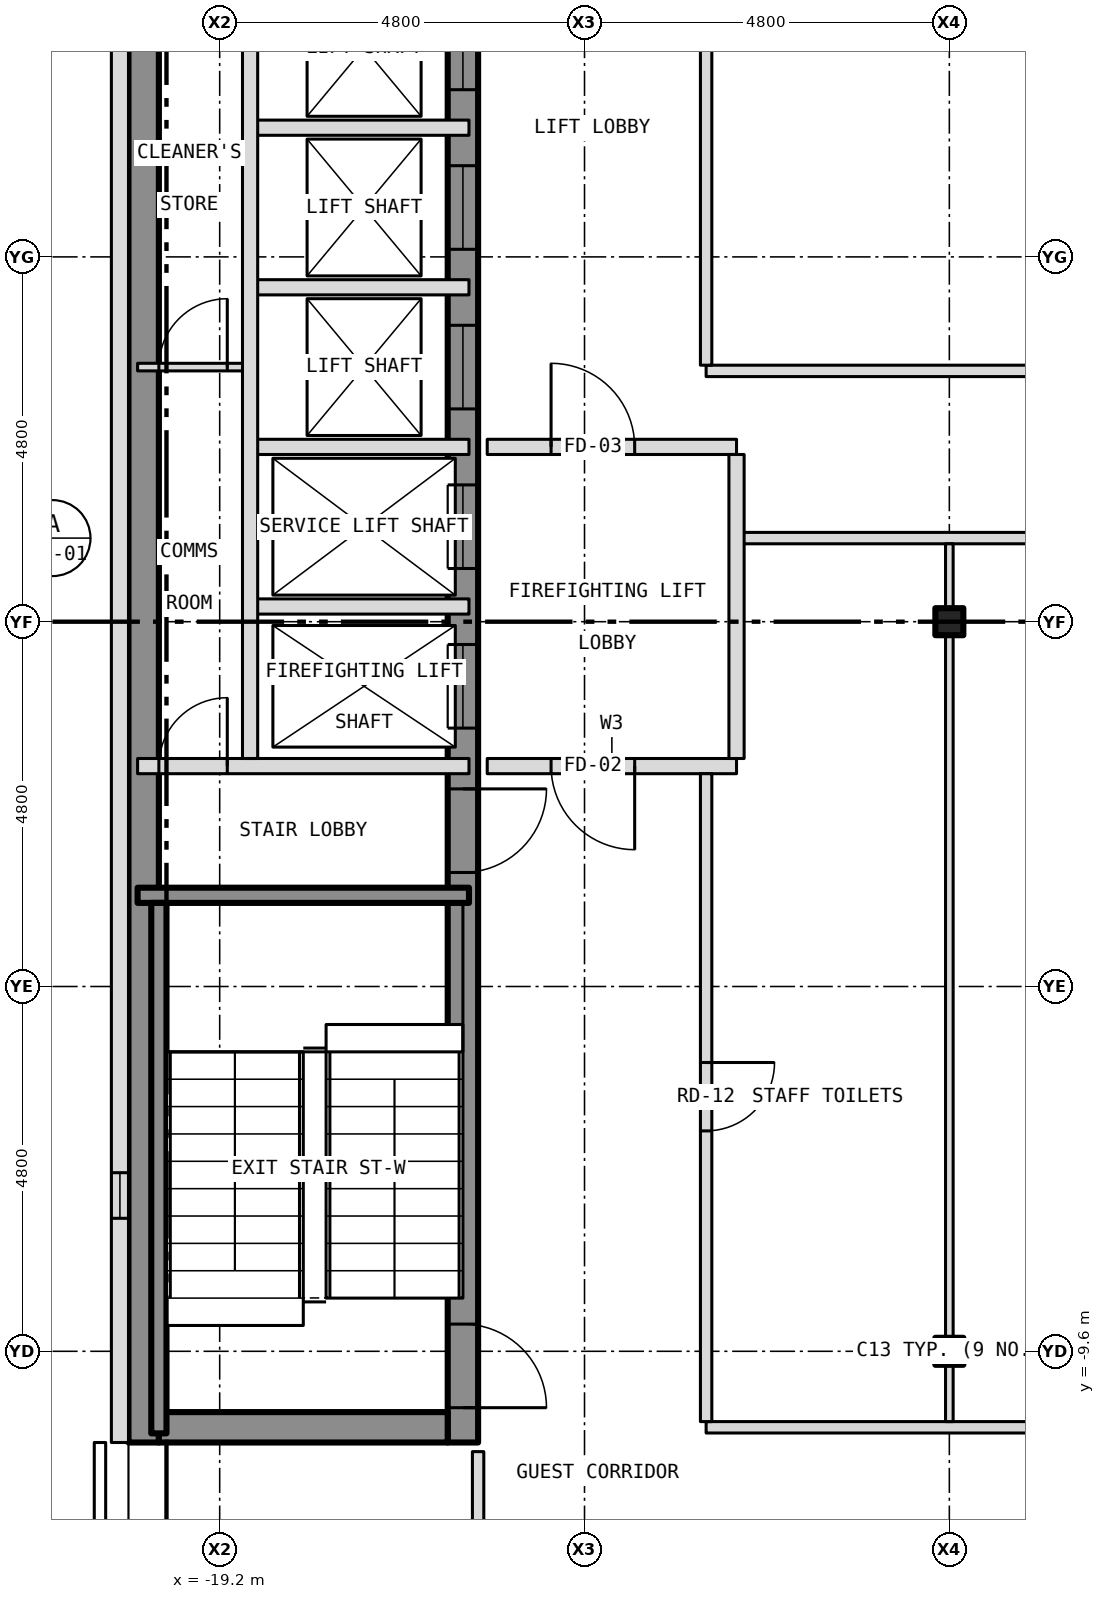
"""IFC4 building model, lengths in metres.
Left out: names, types, materials, properties, quantities, classifications, styles, units other than length and angle.
Written with IfcOpenShell. Run it as: python <this file> out.ifc"""

import sys

from ifc_helpers import new_model, si_unit, direction, frame, frame_2d, origin, origin_2d, place, context, subcontext, project, spatial, rectangle, i_section, extrude, element, fill, save


model = new_model("IFC4")
c1 = context("Model", 3, precision=1e-05, world=origin(), true_north=direction((0.0, 1.0)))
c2 = subcontext(c1, "Body", "Model", "MODEL_VIEW")
j1 = project(units=[si_unit("LENGTHUNIT", "METRE"), si_unit("PLANEANGLEUNIT", "RADIAN")], contexts=[c1])
p1 = place(None, origin())
s1 = spatial("IfcSite", under=j1, at=p1, CompositionType="ELEMENT")
p2 = place(p1, origin())
s2 = spatial("IfcBuilding", under=s1, at=p2, CompositionType="ELEMENT")
p3 = place(p2, frame((0.0, 0.0, 244.5)))
s3 = spatial("IfcBuildingStorey", under=s2, at=p3, CompositionType="ELEMENT", Elevation=244.5)
for number, where, z_axis, x_axis in (
    (1, (-9.6, -9.6, -0.15), (0.0, 0.0, 1.0), (1.0, 0.0, 0.0)),
    (2, (-9.6, 0.0, -0.15), (0.0, 0.0, 1.0), (1.0, 0.0, 0.0)),
):
    element("IfcColumn", number, at=place(p3, frame(where, z_axis=z_axis, x_axis=x_axis)), inside=s3, PredefinedType="COLUMN", context=c2, shape_type="SweptSolid", body=[
        extrude(i_section(OverallWidth=0.368, OverallDepth=0.356, WebThickness=0.011, FlangeThickness=0.018, at=origin_2d()), origin(), (0.0, 0.0, 1.0), 3.5),
    ])
p4 = place(p3, frame((-16.0, -10.8, 0.0), z_axis=(0.0, 0.0, 1.0), x_axis=(0.0, 1.0, 0.0)))
e3 = element("IfcWall", 3, at=p4, inside=s3, PredefinedType="SHEAR", context=c2, shape_type="SweptSolid", body=[
    extrude(rectangle(XDim=21.6, YDim=0.4, at=frame_2d((10.8, 0.0))), origin(), (0.0, 0.0, 1.0), 3.25),
])
p5 = place(p4, frame((9.4, 0.0, 0.0)))
e4 = element("IfcOpeningElement", 4, at=p5, cuts=e3, PredefinedType="OPENING", context=c2, shape_type="SweptSolid", body=[
    extrude(rectangle(XDim=1.1, YDim=2.1, at=frame_2d((0.55, 1.05))), frame((0.0, 0.212, 0.0), z_axis=(0.0, -1.0, 0.0), x_axis=(1.0, 0.0, 0.0)), (0.0, 0.0, 1.0), 0.424),
])
p6 = place(p4, frame((11.5, 0.0, 0.0)))
e5 = element("IfcOpeningElement", 5, at=p6, cuts=e3, PredefinedType="OPENING", context=c2, shape_type="SweptSolid", body=[
    extrude(rectangle(XDim=1.1, YDim=2.1, at=frame_2d((0.55, 1.05))), frame((0.0, 0.212, 0.0), z_axis=(0.0, -1.0, 0.0), x_axis=(1.0, 0.0, 0.0)), (0.0, 0.0, 1.0), 0.424),
])
p7 = place(p4, frame((13.6, 0.0, 0.0)))
e6 = element("IfcOpeningElement", 6, at=p7, cuts=e3, PredefinedType="OPENING", context=c2, shape_type="SweptSolid", body=[
    extrude(rectangle(XDim=1.1, YDim=2.1, at=frame_2d((0.55, 1.05))), frame((0.0, 0.212, 0.0), z_axis=(0.0, -1.0, 0.0), x_axis=(1.0, 0.0, 0.0)), (0.0, 0.0, 1.0), 0.424),
])
p8 = place(p4, frame((15.7, 0.0, 0.0)))
e7 = element("IfcOpeningElement", 7, at=p8, cuts=e3, PredefinedType="OPENING", context=c2, shape_type="SweptSolid", body=[
    extrude(rectangle(XDim=1.1, YDim=2.1, at=frame_2d((0.55, 1.05))), frame((0.0, 0.212, 0.0), z_axis=(0.0, -1.0, 0.0), x_axis=(1.0, 0.0, 0.0)), (0.0, 0.0, 1.0), 0.424),
])
p9 = place(p4, frame((17.8, 0.0, 0.0)))
e8 = element("IfcOpeningElement", 8, at=p9, cuts=e3, PredefinedType="OPENING", context=c2, shape_type="SweptSolid", body=[
    extrude(rectangle(XDim=1.1, YDim=2.1, at=frame_2d((0.55, 1.05))), frame((0.0, 0.212, 0.0), z_axis=(0.0, -1.0, 0.0), x_axis=(1.0, 0.0, 0.0)), (0.0, 0.0, 1.0), 0.424),
])
p10 = place(p4, frame((0.458, 0.0, 0.0)))
e9 = element("IfcOpeningElement", 9, at=p10, cuts=e3, PredefinedType="OPENING", context=c2, shape_type="SweptSolid", body=[
    extrude(rectangle(XDim=1.1, YDim=2.1, at=frame_2d((0.55, 1.05))), frame((0.0, 0.212, 0.0), z_axis=(0.0, -1.0, 0.0), x_axis=(1.0, 0.0, 0.0)), (0.0, 0.0, 1.0), 0.424),
])
p11 = place(p4, frame((7.5, 0.0, 0.0)))
e10 = element("IfcOpeningElement", 10, at=p11, cuts=e3, PredefinedType="OPENING", context=c2, shape_type="SweptSolid", body=[
    extrude(rectangle(XDim=1.1, YDim=2.1, at=frame_2d((0.55, 1.05))), frame((0.0, 0.212, 0.0), z_axis=(0.0, -1.0, 0.0), x_axis=(1.0, 0.0, 0.0)), (0.0, 0.0, 1.0), 0.424),
])
p12 = place(p4, frame((20.0, 0.0, 0.0)))
e11 = element("IfcOpeningElement", 11, at=p12, cuts=e3, PredefinedType="OPENING", context=c2, shape_type="SweptSolid", body=[
    extrude(rectangle(XDim=0.9, YDim=2.1, at=frame_2d((0.45, 1.05))), frame((0.0, 0.212, 0.0), z_axis=(0.0, -1.0, 0.0), x_axis=(1.0, 0.0, 0.0)), (0.0, 0.0, 1.0), 0.424),
])
p13 = place(p3, frame((-20.2, -10.8, 0.0), z_axis=(0.0, 0.0, 1.0), x_axis=(0.0, 1.0, 0.0)))
e12 = element("IfcWall", 12, at=p13, inside=s3, PredefinedType="SHEAR", context=c2, shape_type="SweptSolid", body=[
    extrude(rectangle(XDim=21.6, YDim=0.4, at=frame_2d((10.8, 0.0))), origin(), (0.0, 0.0, 1.0), 3.25),
])
p14 = place(p3, frame((-20.0, -10.6, 0.0), z_axis=(0.0, 0.0, 1.0), x_axis=(1.0, 0.0, 0.0)))
e13 = element("IfcWall", 13, at=p14, inside=s3, PredefinedType="SHEAR", context=c2, shape_type="SweptSolid", body=[
    extrude(rectangle(XDim=3.8, YDim=0.4, at=frame_2d((1.9, 0.0))), origin(), (0.0, 0.0, 1.0), 3.25),
])
p15 = place(p3, frame((-20.512, 10.8, 0.0), z_axis=(0.0, 0.0, 1.0), x_axis=(0.0, -1.0, 0.0)))
e14 = element("IfcWall", 14, at=p15, inside=s3, PredefinedType="SOLIDWALL", context=c2, shape_type="SweptSolid", body=[
    extrude(rectangle(XDim=21.6, YDim=0.225, at=frame_2d((10.8, 0.0))), origin(), (0.0, 0.0, 1.0), 3.5),
])
p16 = place(p15, frame((18.05, 0.0, 1.0)))
e15 = element("IfcOpeningElement", 15, at=p16, cuts=e14, PredefinedType="OPENING", context=c2, shape_type="SweptSolid", body=[
    extrude(rectangle(XDim=0.6, YDim=1.5, at=frame_2d((0.3, 0.75))), frame((0.0, 0.125, 0.0), z_axis=(0.0, -1.0, 0.0), x_axis=(1.0, 0.0, 0.0)), (0.0, 0.0, 1.0), 0.249),
])
p17 = place(p3, frame((-12.8, -10.6, 0.0), z_axis=(0.0, 0.0, 1.0), x_axis=(1.0, 0.0, 0.0)))
e16 = element("IfcWall", 16, at=p17, inside=s3, PredefinedType="PARTITIONING", context=c2, shape_type="SweptSolid", body=[
    extrude(rectangle(XDim=20.3, YDim=0.15, at=frame_2d((10.15, 0.0))), origin(), (0.0, 0.0, 1.0), 3.35),
])
p18 = place(p17, frame((11.3, 0.0, 0.0)))
e17 = element("IfcOpeningElement", 17, at=p18, cuts=e16, PredefinedType="OPENING", context=c2, shape_type="SweptSolid", body=[
    extrude(rectangle(XDim=0.9, YDim=2.1, at=frame_2d((0.45, 1.05))), frame((0.0, 0.087, 0.0), z_axis=(0.0, -1.0, 0.0), x_axis=(1.0, 0.0, 0.0)), (0.0, 0.0, 1.0), 0.174),
])
p19 = place(p3, frame((-20.28, -3.6, 0.0), z_axis=(0.0, 0.0, 1.0), x_axis=(1.0, 0.0, 0.0)))
e18 = element("IfcWall", 18, at=p19, inside=s3, PredefinedType="SHEAR", context=c2, shape_type="SweptSolid", body=[
    extrude(rectangle(XDim=4.36, YDim=0.2, at=frame_2d((2.18, 0.0))), origin(), (0.0, 0.0, 1.0), 3.25),
])
p20 = place(p3, frame((-20.28, -1.9, 0.0), z_axis=(0.0, 0.0, 1.0), x_axis=(1.0, 0.0, 0.0)))
e19 = element("IfcWall", 19, at=p20, inside=s3, PredefinedType="PARTITIONING", context=c2, shape_type="SweptSolid", body=[
    extrude(rectangle(XDim=4.36, YDim=0.2, at=frame_2d((2.18, 0.0))), origin(), (0.0, 0.0, 1.0), 3.25),
])
p21 = place(p20, frame((0.28, 0.0, 0.0)))
e20 = element("IfcOpeningElement", 20, at=p21, cuts=e19, PredefinedType="OPENING", context=c2, shape_type="SweptSolid", body=[
    extrude(rectangle(XDim=0.9, YDim=2.1, at=frame_2d((0.45, 1.05))), frame((0.0, 0.112, 0.0), z_axis=(0.0, -1.0, 0.0), x_axis=(1.0, 0.0, 0.0)), (0.0, 0.0, 1.0), 0.224),
])
p22 = place(p3, frame((-15.68, -1.9, 0.0), z_axis=(0.0, 0.0, 1.0), x_axis=(1.0, 0.0, 0.0)))
e21 = element("IfcWall", 21, at=p22, inside=s3, PredefinedType="PARTITIONING", context=c2, shape_type="SweptSolid", body=[
    extrude(rectangle(XDim=3.28, YDim=0.2, at=frame_2d((1.64, 0.0))), origin(), (0.0, 0.0, 1.0), 3.35),
])
p23 = place(p22, frame((0.84, 0.0, 0.0)))
e22 = element("IfcOpeningElement", 22, at=p23, cuts=e21, PredefinedType="OPENING", context=c2, shape_type="SweptSolid", body=[
    extrude(rectangle(XDim=1.1, YDim=2.1, at=frame_2d((0.55, 1.05))), frame((0.0, 0.112, 0.0), z_axis=(0.0, -1.0, 0.0), x_axis=(1.0, 0.0, 0.0)), (0.0, 0.0, 1.0), 0.224),
])
p24 = place(p3, frame((-18.8, 0.2, 0.0), z_axis=(0.0, 0.0, 1.0), x_axis=(1.0, 0.0, 0.0)))
e23 = element("IfcWall", 23, at=p24, inside=s3, PredefinedType="PARTITIONING", context=c2, shape_type="SweptSolid", body=[
    extrude(rectangle(XDim=2.88, YDim=0.2, at=frame_2d((1.44, 0.0))), origin(), (0.0, 0.0, 1.0), 3.25),
])
p25 = place(p3, frame((-12.4, 1.1, 0.0), z_axis=(0.0, 0.0, 1.0), x_axis=(1.0, 0.0, 0.0)))
e24 = element("IfcWall", 24, at=p25, inside=s3, PredefinedType="PARTITIONING", context=c2, shape_type="SweptSolid", body=[
    extrude(rectangle(XDim=19.9, YDim=0.15, at=frame_2d((9.95, 0.0))), origin(), (0.0, 0.0, 1.0), 3.35),
])
p26 = place(p3, frame((-18.8, 2.3, 0.0), z_axis=(0.0, 0.0, 1.0), x_axis=(1.0, 0.0, 0.0)))
e25 = element("IfcWall", 25, at=p26, inside=s3, PredefinedType="PARTITIONING", context=c2, shape_type="SweptSolid", body=[
    extrude(rectangle(XDim=2.88, YDim=0.2, at=frame_2d((1.44, 0.0))), origin(), (0.0, 0.0, 1.0), 3.25),
])
p27 = place(p3, frame((-15.68, 2.3, 0.0), z_axis=(0.0, 0.0, 1.0), x_axis=(1.0, 0.0, 0.0)))
e26 = element("IfcWall", 26, at=p27, inside=s3, PredefinedType="PARTITIONING", context=c2, shape_type="SweptSolid", body=[
    extrude(rectangle(XDim=3.28, YDim=0.2, at=frame_2d((1.64, 0.0))), origin(), (0.0, 0.0, 1.0), 3.35),
])
p28 = place(p27, frame((0.84, 0.0, 0.0)))
e27 = element("IfcOpeningElement", 27, at=p28, cuts=e26, PredefinedType="OPENING", context=c2, shape_type="SweptSolid", body=[
    extrude(rectangle(XDim=1.1, YDim=2.1, at=frame_2d((0.55, 1.05))), frame((0.0, 0.112, 0.0), z_axis=(0.0, -1.0, 0.0), x_axis=(1.0, 0.0, 0.0)), (0.0, 0.0, 1.0), 0.224),
])
p29 = place(p3, frame((-12.8, 3.3, 0.0), z_axis=(0.0, 0.0, 1.0), x_axis=(1.0, 0.0, 0.0)))
e28 = element("IfcWall", 28, at=p29, inside=s3, PredefinedType="PARTITIONING", context=c2, shape_type="SweptSolid", body=[
    extrude(rectangle(XDim=20.3, YDim=0.15, at=frame_2d((10.15, 0.0))), origin(), (0.0, 0.0, 1.0), 3.35),
])
p30 = place(p29, frame((16.1, 0.0, 0.0)))
e29 = element("IfcOpeningElement", 29, at=p30, cuts=e28, PredefinedType="OPENING", context=c2, shape_type="SweptSolid", body=[
    extrude(rectangle(XDim=0.9, YDim=2.1, at=frame_2d((0.45, 1.05))), frame((0.0, 0.087, 0.0), z_axis=(0.0, -1.0, 0.0), x_axis=(1.0, 0.0, 0.0)), (0.0, 0.0, 1.0), 0.174),
])
p31 = place(p3, frame((-20.28, 3.35, 0.0), z_axis=(0.0, 0.0, 1.0), x_axis=(1.0, 0.0, 0.0)))
e30 = element("IfcWall", 30, at=p31, inside=s3, PredefinedType="PARTITIONING", context=c2, shape_type="SweptSolid", body=[
    extrude(rectangle(XDim=1.48, YDim=0.1, at=frame_2d((0.74, 0.0))), origin(), (0.0, 0.0, 1.0), 3.25),
])
p32 = place(p31, frame((0.28, 0.0, 0.0)))
e31 = element("IfcOpeningElement", 31, at=p32, cuts=e30, PredefinedType="OPENING", context=c2, shape_type="SweptSolid", body=[
    extrude(rectangle(XDim=0.9, YDim=2.1, at=frame_2d((0.45, 1.05))), frame((0.0, 0.062, 0.0), z_axis=(0.0, -1.0, 0.0), x_axis=(1.0, 0.0, 0.0)), (0.0, 0.0, 1.0), 0.124),
])
for number, where, z_axis, x_axis in (
    (32, (-18.8, 4.4, 0.0), (0.0, 0.0, 1.0), (1.0, 0.0, 0.0)),
    (33, (-18.8, 6.5, 0.0), (0.0, 0.0, 1.0), (1.0, 0.0, 0.0)),
):
    element("IfcWall", number, at=place(p3, frame(where, z_axis=z_axis, x_axis=x_axis)), inside=s3, PredefinedType="PARTITIONING", context=c2, shape_type="SweptSolid", body=[
        extrude(rectangle(XDim=2.88, YDim=0.2, at=frame_2d((1.44, 0.0))), origin(), (0.0, 0.0, 1.0), 3.25),
    ])
p33 = place(p3, frame((-20.0, -10.68, 0.0), z_axis=(0.0, 0.0, 1.0), x_axis=(0.0, 1.0, 0.0)))
e34 = element("IfcWall", 34, at=p33, inside=s3, PredefinedType="SHEAR", context=c2, shape_type="SweptSolid", body=[
    extrude(rectangle(XDim=6.98, YDim=0.2, at=frame_2d((3.49, 0.0))), origin(), (0.0, 0.0, 1.0), 3.25),
])
p34 = place(p3, frame((-18.8, -1.8, 0.0), z_axis=(0.0, 0.0, 1.0), x_axis=(0.0, 1.0, 0.0)))
e35 = element("IfcWall", 35, at=p34, inside=s3, PredefinedType="PARTITIONING", context=c2, shape_type="SweptSolid", body=[
    extrude(rectangle(XDim=10.3, YDim=0.2, at=frame_2d((5.15, 0.0))), origin(), (0.0, 0.0, 1.0), 3.25),
])
p35 = place(p3, frame((-15.8, -12.725, 0.0), z_axis=(0.0, 0.0, 1.0), x_axis=(0.0, 1.0, 0.0)))
e36 = element("IfcWall", 36, at=p35, inside=s3, PredefinedType="PARTITIONING", context=c2, shape_type="SweptSolid", body=[
    extrude(rectangle(XDim=1.805, YDim=0.15, at=frame_2d((0.903, 0.0))), origin(), (0.0, 0.0, 1.0), 3.35),
])
p36 = place(p3, frame((-12.8, -10.525, 0.0), z_axis=(0.0, 0.0, 1.0), x_axis=(0.0, 1.0, 0.0)))
e37 = element("IfcWall", 37, at=p36, inside=s3, PredefinedType="PARTITIONING", context=c2, shape_type="SweptSolid", body=[
    extrude(rectangle(XDim=8.525, YDim=0.15, at=frame_2d((4.262, 0.0))), origin(), (0.0, 0.0, 1.0), 3.35),
])
p37 = place(p36, frame((3.825, 0.0, 0.0)))
e38 = element("IfcOpeningElement", 38, at=p37, cuts=e37, PredefinedType="OPENING", context=c2, shape_type="SweptSolid", body=[
    extrude(rectangle(XDim=0.9, YDim=2.1, at=frame_2d((0.45, 1.05))), frame((0.0, 0.087, 0.0), z_axis=(0.0, -1.0, 0.0), x_axis=(1.0, 0.0, 0.0)), (0.0, 0.0, 1.0), 0.174),
])
p38 = place(p3, frame((-12.8, 3.375, 0.0), z_axis=(0.0, 0.0, 1.0), x_axis=(0.0, 1.0, 0.0)))
e39 = element("IfcWall", 39, at=p38, inside=s3, PredefinedType="PARTITIONING", context=c2, shape_type="SweptSolid", body=[
    extrude(rectangle(XDim=7.175, YDim=0.15, at=frame_2d((3.587, 0.0))), origin(), (0.0, 0.0, 1.0), 3.35),
])
p39 = place(p3, frame((-12.4, -1.8, 0.0), z_axis=(0.0, 0.0, 1.0), x_axis=(0.0, 1.0, 0.0)))
e40 = element("IfcWall", 40, at=p39, inside=s3, PredefinedType="PARTITIONING", context=c2, shape_type="SweptSolid", body=[
    extrude(rectangle(XDim=4.0, YDim=0.2, at=frame_2d((2.0, 0.0))), origin(), (0.0, 0.0, 1.0), 3.35),
])
p40 = place(p3, frame((-9.6, -10.525, 0.0), z_axis=(0.0, 0.0, 1.0), x_axis=(0.0, 1.0, 0.0)))
e41 = element("IfcWall", 41, at=p40, inside=s3, PredefinedType="PARTITIONING", context=c2, shape_type="SweptSolid", body=[
    extrude(rectangle(XDim=0.741, YDim=0.1, at=frame_2d((0.371, 0.0))), origin(), (0.0, 0.0, 1.0), 2.728),
])
p41 = place(p3, frame((-9.6, -9.784, 0.0), z_axis=(0.0, 0.0, 1.0), x_axis=(0.0, 1.0, 0.0)))
e42 = element("IfcWall", 42, at=p41, inside=s3, PredefinedType="PARTITIONING", context=c2, shape_type="SweptSolid", body=[
    extrude(rectangle(XDim=0.368, YDim=0.1, at=frame_2d((0.184, 0.0))), origin(), (0.0, 0.0, 1.0), 3.35),
])
p42 = place(p3, frame((-9.6, -9.416, 0.0), z_axis=(0.0, 0.0, 1.0), x_axis=(0.0, 1.0, 0.0)))
e43 = element("IfcWall", 43, at=p42, inside=s3, PredefinedType="PARTITIONING", context=c2, shape_type="SweptSolid", body=[
    extrude(rectangle(XDim=9.232, YDim=0.1, at=frame_2d((4.616, 0.0))), origin(), (0.0, 0.0, 1.0), 2.728),
])
p43 = place(p3, frame((-9.6, -0.184, 0.0), z_axis=(0.0, 0.0, 1.0), x_axis=(0.0, 1.0, 0.0)))
e44 = element("IfcWall", 44, at=p43, inside=s3, PredefinedType="PARTITIONING", context=c2, shape_type="SweptSolid", body=[
    extrude(rectangle(XDim=0.368, YDim=0.1, at=frame_2d((0.184, 0.0))), origin(), (0.0, 0.0, 1.0), 3.35),
])
p44 = place(p3, frame((-9.6, 0.184, 0.0), z_axis=(0.0, 0.0, 1.0), x_axis=(0.0, 1.0, 0.0)))
e45 = element("IfcWall", 45, at=p44, inside=s3, PredefinedType="PARTITIONING", context=c2, shape_type="SweptSolid", body=[
    extrude(rectangle(XDim=0.841, YDim=0.1, at=frame_2d((0.42, 0.0))), origin(), (0.0, 0.0, 1.0), 2.728),
])
p45 = place(p16, origin())
e46 = element("IfcWindow", 46, at=p45, inside=s3, PartitioningType="SINGLE_PANEL", PredefinedType="WINDOW", context=c2, shape_type="SweptSolid", body=[
    extrude(rectangle(XDim=0.6, YDim=1.5, at=frame_2d((0.3, 0.75))), frame((0.0, -0.022, 0.0), z_axis=(0.0, -1.0, 0.0), x_axis=(1.0, 0.0, 0.0)), (0.0, 0.0, 1.0), 0.06),
])
fill(e15, e46)
p46 = place(p5, origin())
e47 = element("IfcDoor", 47, at=p46, inside=s3, OperationType="SLIDING_TO_LEFT", PredefinedType="DOOR", context=c2, shape_type="SweptSolid", body=[
    extrude(rectangle(XDim=1.1, YDim=2.1, at=frame_2d((0.55, 1.05))), frame((0.0, 0.025, 0.0), z_axis=(0.0, -1.0, 0.0), x_axis=(1.0, 0.0, 0.0)), (0.0, 0.0, 1.0), 0.05),
])
fill(e4, e47)
p47 = place(p6, origin())
e48 = element("IfcDoor", 48, at=p47, inside=s3, OperationType="SLIDING_TO_LEFT", PredefinedType="DOOR", context=c2, shape_type="SweptSolid", body=[
    extrude(rectangle(XDim=1.1, YDim=2.1, at=frame_2d((0.55, 1.05))), frame((0.0, 0.025, 0.0), z_axis=(0.0, -1.0, 0.0), x_axis=(1.0, 0.0, 0.0)), (0.0, 0.0, 1.0), 0.05),
])
fill(e5, e48)
p48 = place(p7, origin())
e49 = element("IfcDoor", 49, at=p48, inside=s3, OperationType="SLIDING_TO_LEFT", PredefinedType="DOOR", context=c2, shape_type="SweptSolid", body=[
    extrude(rectangle(XDim=1.1, YDim=2.1, at=frame_2d((0.55, 1.05))), frame((0.0, 0.025, 0.0), z_axis=(0.0, -1.0, 0.0), x_axis=(1.0, 0.0, 0.0)), (0.0, 0.0, 1.0), 0.05),
])
fill(e6, e49)
p49 = place(p8, origin())
e50 = element("IfcDoor", 50, at=p49, inside=s3, OperationType="SLIDING_TO_LEFT", PredefinedType="DOOR", context=c2, shape_type="SweptSolid", body=[
    extrude(rectangle(XDim=1.1, YDim=2.1, at=frame_2d((0.55, 1.05))), frame((0.0, 0.025, 0.0), z_axis=(0.0, -1.0, 0.0), x_axis=(1.0, 0.0, 0.0)), (0.0, 0.0, 1.0), 0.05),
])
fill(e7, e50)
p50 = place(p9, origin())
e51 = element("IfcDoor", 51, at=p50, inside=s3, OperationType="SLIDING_TO_LEFT", PredefinedType="DOOR", context=c2, shape_type="SweptSolid", body=[
    extrude(rectangle(XDim=1.1, YDim=2.1, at=frame_2d((0.55, 1.05))), frame((0.0, 0.025, 0.0), z_axis=(0.0, -1.0, 0.0), x_axis=(1.0, 0.0, 0.0)), (0.0, 0.0, 1.0), 0.05),
])
fill(e8, e51)
p51 = place(p10, origin())
e52 = element("IfcDoor", 52, at=p51, inside=s3, OperationType="SINGLE_SWING_LEFT", PredefinedType="DOOR", context=c2, shape_type="SweptSolid", body=[
    extrude(rectangle(XDim=1.1, YDim=2.1, at=frame_2d((0.55, 1.05))), frame((0.0, 0.025, 0.0), z_axis=(0.0, -1.0, 0.0), x_axis=(1.0, 0.0, 0.0)), (0.0, 0.0, 1.0), 0.05),
])
fill(e9, e52)
p52 = place(p11, origin())
e53 = element("IfcDoor", 53, at=p52, inside=s3, OperationType="SINGLE_SWING_RIGHT", PredefinedType="DOOR", context=c2, shape_type="SweptSolid", body=[
    extrude(rectangle(XDim=1.1, YDim=2.1, at=frame_2d((0.55, 1.05))), frame((0.0, 0.025, 0.0), z_axis=(0.0, -1.0, 0.0), x_axis=(1.0, 0.0, 0.0)), (0.0, 0.0, 1.0), 0.05),
])
fill(e10, e53)
p53 = place(p21, origin())
e54 = element("IfcDoor", 54, at=p53, inside=s3, OperationType="SINGLE_SWING_RIGHT", PredefinedType="DOOR", context=c2, shape_type="SweptSolid", body=[
    extrude(rectangle(XDim=0.9, YDim=2.1, at=frame_2d((0.45, 1.05))), frame((0.0, 0.025, 0.0), z_axis=(0.0, -1.0, 0.0), x_axis=(1.0, 0.0, 0.0)), (0.0, 0.0, 1.0), 0.05),
])
fill(e20, e54)
p54 = place(p32, origin())
e55 = element("IfcDoor", 55, at=p54, inside=s3, OperationType="SINGLE_SWING_RIGHT", PredefinedType="DOOR", context=c2, shape_type="SweptSolid", body=[
    extrude(rectangle(XDim=0.9, YDim=2.1, at=frame_2d((0.45, 1.05))), frame((0.0, 0.025, 0.0), z_axis=(0.0, -1.0, 0.0), x_axis=(1.0, 0.0, 0.0)), (0.0, 0.0, 1.0), 0.05),
])
fill(e31, e55)
p55 = place(p23, origin())
e56 = element("IfcDoor", 56, at=p55, inside=s3, OperationType="SINGLE_SWING_RIGHT", PredefinedType="DOOR", context=c2, shape_type="SweptSolid", body=[
    extrude(rectangle(XDim=1.1, YDim=2.1, at=frame_2d((0.55, 1.05))), frame((0.0, 0.025, 0.0), z_axis=(0.0, -1.0, 0.0), x_axis=(1.0, 0.0, 0.0)), (0.0, 0.0, 1.0), 0.05),
])
fill(e22, e56)
p56 = place(p28, origin())
e57 = element("IfcDoor", 57, at=p56, inside=s3, OperationType="SINGLE_SWING_LEFT", PredefinedType="DOOR", context=c2, shape_type="SweptSolid", body=[
    extrude(rectangle(XDim=1.1, YDim=2.1, at=frame_2d((0.55, 1.05))), frame((0.0, 0.025, 0.0), z_axis=(0.0, -1.0, 0.0), x_axis=(1.0, 0.0, 0.0)), (0.0, 0.0, 1.0), 0.05),
])
fill(e27, e57)
p57 = place(p37, origin())
e58 = element("IfcDoor", 58, at=p57, inside=s3, OperationType="SINGLE_SWING_RIGHT", PredefinedType="DOOR", context=c2, shape_type="SweptSolid", body=[
    extrude(rectangle(XDim=0.9, YDim=2.1, at=frame_2d((0.45, 1.05))), frame((0.0, 0.025, 0.0), z_axis=(0.0, -1.0, 0.0), x_axis=(1.0, 0.0, 0.0)), (0.0, 0.0, 1.0), 0.05),
])
fill(e38, e58)
save(model, sys.argv[1])
